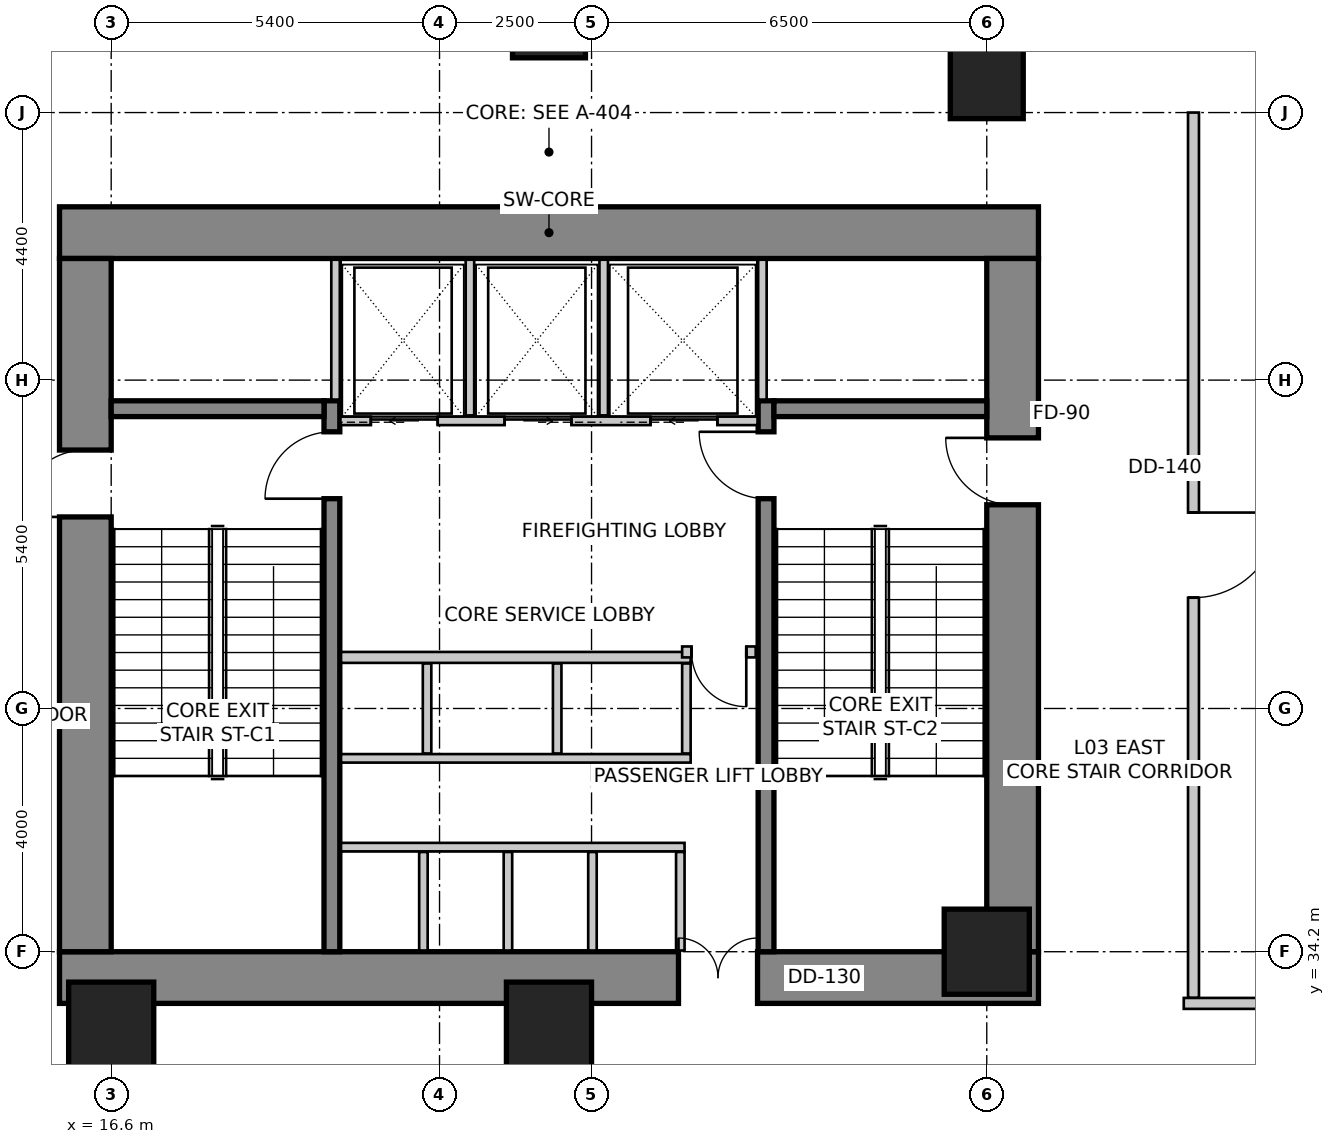
"""IFC4 building model, lengths in metres.
Left out: names, types, materials, properties, quantities, classifications, styles, units other than length and angle.
Written with IfcOpenShell. Run it as: python <this file> out.ifc"""

import sys

from ifc_helpers import new_model, si_unit, direction, frame, frame_2d, origin, origin_2d, place, context, subcontext, project, spatial, rectangle, extrude, source, transform, mapped, element, fill, save


model = new_model("IFC4")
c1 = context("Model", 3, precision=1e-05, world=origin(), true_north=direction((0.0, 1.0)))
c2 = subcontext(c1, "Body", "Model", "MODEL_VIEW")
j1 = project(units=[si_unit("LENGTHUNIT", "METRE"), si_unit("PLANEANGLEUNIT", "RADIAN")], contexts=[c1])
p1 = place(None, origin())
s1 = spatial("IfcSite", under=j1, at=p1, CompositionType="ELEMENT")
p2 = place(p1, origin())
s2 = spatial("IfcBuilding", under=s1, at=p2, CompositionType="ELEMENT")
p3 = place(p2, frame((0.0, 0.0, 11.2)))
s3 = spatial("IfcBuildingStorey", under=s2, at=p3, CompositionType="ELEMENT", Elevation=11.2)
p4 = place(p3, frame((15.75, 46.025, 0.0), z_axis=(0.0, 0.0, 1.0), x_axis=(1.0, 0.0, 0.0)))
e1 = element("IfcWall", 1, at=p4, inside=s3, PredefinedType="SHEAR", context=c2, shape_type="SweptSolid", body=[
    extrude(rectangle(XDim=16.1, YDim=0.85, at=frame_2d((8.05, 0.0))), origin(), (0.0, 0.0, 1.0), 5.2),
])
p5 = place(p3, frame((15.75, 33.775, 0.0), z_axis=(0.0, 0.0, 1.0), x_axis=(1.0, 0.0, 0.0)))
e2 = element("IfcWall", 2, at=p5, inside=s3, PredefinedType="SHEAR", context=c2, shape_type="SweptSolid", body=[
    extrude(rectangle(XDim=16.1, YDim=0.85, at=frame_2d((8.05, 0.0))), origin(), (0.0, 0.0, 1.0), 5.2),
])
m1 = source(origin(), c2, "Body", "SweptSolid", [
    extrude(rectangle(XDim=1.3, YDim=2.15, at=frame_2d((0.65, 1.075))), frame((0.0, 0.435, 0.0), z_axis=(0.0, -1.0, 0.0), x_axis=(1.0, 0.0, 0.0)), (0.0, 0.0, 1.0), 0.87),
])
p6 = place(p5, frame((10.18, 0.0, 0.0)))
e3 = element("IfcOpeningElement", 3, at=p6, cuts=e2, PredefinedType="OPENING", context=c2, shape_type="MappedRepresentation", body=[
    mapped(m1, transform((0.0, 0.0, 0.0), scale=1.0)),
])
p7 = place(p3, frame((16.175, 34.2, 0.0), z_axis=(0.0, 0.0, 1.0), x_axis=(0.0, 1.0, 0.0)))
e4 = element("IfcWall", 4, at=p7, inside=s3, PredefinedType="SHEAR", context=c2, shape_type="SweptSolid", body=[
    extrude(rectangle(XDim=11.4, YDim=0.85, at=frame_2d((5.7, 0.0))), origin(), (0.0, 0.0, 1.0), 5.2),
])
m2 = source(origin(), c2, "Body", "SweptSolid", [
    extrude(rectangle(XDim=1.1, YDim=2.15, at=frame_2d((0.55, 1.075))), frame((0.0, 0.435, 0.0), z_axis=(0.0, -1.0, 0.0), x_axis=(1.0, 0.0, 0.0)), (0.0, 0.0, 1.0), 0.87),
])
p8 = place(p7, frame((7.15, 0.0, 0.0)))
e5 = element("IfcOpeningElement", 5, at=p8, cuts=e4, PredefinedType="OPENING", context=c2, shape_type="MappedRepresentation", body=[
    mapped(m2, transform((0.0, 0.0, 0.0), scale=1.0)),
])
p9 = place(p3, frame((31.425, 34.2, 0.0), z_axis=(0.0, 0.0, 1.0), x_axis=(0.0, 1.0, 0.0)))
e6 = element("IfcWall", 6, at=p9, inside=s3, PredefinedType="SHEAR", context=c2, shape_type="SweptSolid", body=[
    extrude(rectangle(XDim=11.4, YDim=0.85, at=frame_2d((5.7, 0.0))), origin(), (0.0, 0.0, 1.0), 5.2),
])
p10 = place(p9, frame((7.35, 0.0, 0.0)))
e7 = element("IfcOpeningElement", 7, at=p10, cuts=e6, PredefinedType="OPENING", context=c2, shape_type="MappedRepresentation", body=[
    mapped(m2, transform((0.0, 0.0, 0.0), scale=1.0)),
])
p11 = place(p3, frame((20.23, 34.2, 0.0), z_axis=(0.0, 0.0, 1.0), x_axis=(0.0, 1.0, 0.0)))
e8 = element("IfcWall", 8, at=p11, inside=s3, PredefinedType="SHEAR", context=c2, shape_type="SweptSolid", body=[
    extrude(rectangle(XDim=9.06, YDim=0.26, at=frame_2d((4.53, 0.0))), origin(), (0.0, 0.0, 1.0), 5.2),
])
m3 = source(origin(), c2, "Body", "SweptSolid", [
    extrude(rectangle(XDim=1.1, YDim=2.15, at=frame_2d((0.55, 1.075))), frame((0.0, 0.14, 0.0), z_axis=(0.0, -1.0, 0.0), x_axis=(1.0, 0.0, 0.0)), (0.0, 0.0, 1.0), 0.28),
])
p12 = place(p11, frame((7.45, 0.0, 0.0)))
e9 = element("IfcOpeningElement", 9, at=p12, cuts=e8, PredefinedType="OPENING", context=c2, shape_type="MappedRepresentation", body=[
    mapped(m3, transform((0.0, 0.0, 0.0), scale=1.0)),
])
p13 = place(p3, frame((27.37, 34.2, 0.0), z_axis=(0.0, 0.0, 1.0), x_axis=(0.0, 1.0, 0.0)))
e10 = element("IfcWall", 10, at=p13, inside=s3, PredefinedType="SHEAR", context=c2, shape_type="SweptSolid", body=[
    extrude(rectangle(XDim=9.06, YDim=0.26, at=frame_2d((4.53, 0.0))), origin(), (0.0, 0.0, 1.0), 5.2),
])
p14 = place(p13, frame((7.45, 0.0, 0.0)))
e11 = element("IfcOpeningElement", 11, at=p14, cuts=e10, PredefinedType="OPENING", context=c2, shape_type="MappedRepresentation", body=[
    mapped(m3, transform((0.0, 0.0, 0.0), scale=1.0)),
])
for number, where, z_axis, x_axis in (
    (12, (16.6, 43.13, 0.0), (0.0, 0.0, 1.0), (1.0, 0.0, 0.0)),
    (13, (27.5, 43.13, 0.0), (0.0, 0.0, 1.0), (1.0, 0.0, 0.0)),
):
    element("IfcWall", number, at=place(p3, frame(where, z_axis=z_axis, x_axis=x_axis)), inside=s3, PredefinedType="SHEAR", context=c2, shape_type="SweptSolid", body=[
        extrude(rectangle(XDim=3.5, YDim=0.26, at=frame_2d((1.75, 0.0))), origin(), (0.0, 0.0, 1.0), 5.2),
    ])
m4 = source(origin(), c2, "Body", "SweptSolid", [
    extrude(rectangle(XDim=1.4, YDim=1.4, at=origin_2d()), origin(), (0.0, 0.0, 1.0), 5.2),
])
for number, where, z_axis, x_axis in (
    (14, (16.6, 33.0, 0.0), (0.0, 0.0, 1.0), (1.0, 0.0, 0.0)),
    (15, (23.8, 33.0, 0.0), (0.0, 0.0, 1.0), (1.0, 0.0, 0.0)),
    (16, (31.0, 34.2, 0.0), (0.0, 0.0, 1.0), (1.0, 0.0, 0.0)),
):
    element("IfcColumn", number, at=place(p3, frame(where, z_axis=z_axis, x_axis=x_axis)), inside=s3, PredefinedType="COLUMN", context=c2, shape_type="MappedRepresentation", body=[
        mapped(m4, transform((0.0, 0.0, 0.0), scale=1.0)),
    ])
m5 = source(origin(), c2, "Body", "SweptSolid", [
    extrude(rectangle(XDim=1.2, YDim=1.2, at=origin_2d()), origin(), (0.0, 0.0, 1.0), 5.2),
])
for number, where, z_axis, x_axis in (
    (17, (23.8, 49.5, 0.0), (0.0, 0.0, 1.0), (1.0, 0.0, 0.0)),
    (18, (31.0, 48.5, 0.0), (0.0, 0.0, 1.0), (1.0, 0.0, 0.0)),
):
    element("IfcColumn", number, at=place(p3, frame(where, z_axis=z_axis, x_axis=x_axis)), inside=s3, PredefinedType="COLUMN", context=c2, shape_type="MappedRepresentation", body=[
        mapped(m5, transform((0.0, 0.0, 0.0), scale=1.0)),
    ])
p15 = place(p3, frame((20.37, 42.93, 0.0), z_axis=(0.0, 0.0, 1.0), x_axis=(1.0, 0.0, 0.0)))
e19 = element("IfcWall", 19, at=p15, inside=s3, PredefinedType="SOLIDWALL", context=c2, shape_type="SweptSolid", body=[
    extrude(rectangle(XDim=6.86, YDim=0.14, at=frame_2d((3.43, 0.0))), origin(), (0.0, 0.0, 1.0), 4.9),
])
m6 = source(origin(), c2, "Body", "SweptSolid", [
    extrude(rectangle(XDim=1.1, YDim=2.15, at=frame_2d((0.55, 1.075))), frame((0.0, 0.08, 0.0), z_axis=(0.0, -1.0, 0.0), x_axis=(1.0, 0.0, 0.0)), (0.0, 0.0, 1.0), 0.16),
])
p16 = place(p15, frame((0.5, 0.0, 0.0)))
e20 = element("IfcOpeningElement", 20, at=p16, cuts=e19, PredefinedType="OPENING", context=c2, shape_type="MappedRepresentation", body=[
    mapped(m6, transform((0.0, 0.0, 0.0), scale=1.0)),
])
p17 = place(p15, frame((2.7, 0.0, 0.0)))
e21 = element("IfcOpeningElement", 21, at=p17, cuts=e19, PredefinedType="OPENING", context=c2, shape_type="MappedRepresentation", body=[
    mapped(m6, transform((0.0, 0.0, 0.0), scale=1.0)),
])
p18 = place(p15, frame((5.1, 0.0, 0.0)))
e22 = element("IfcOpeningElement", 22, at=p18, cuts=e19, PredefinedType="OPENING", context=c2, shape_type="MappedRepresentation", body=[
    mapped(m6, transform((0.0, 0.0, 0.0), scale=1.0)),
])
for number, where, z_axis, x_axis in (
    (23, (20.29, 43.28, 0.0), (0.0, 0.0, 1.0), (0.0, 1.0, 0.0)),
    (24, (27.31, 43.28, 0.0), (0.0, 0.0, 1.0), (0.0, 1.0, 0.0)),
):
    element("IfcWall", number, at=place(p3, frame(where, z_axis=z_axis, x_axis=x_axis)), inside=s3, PredefinedType="SOLIDWALL", context=c2, shape_type="SweptSolid", body=[
        extrude(rectangle(XDim=2.3, YDim=0.14, at=frame_2d((1.15, 0.0))), origin(), (0.0, 0.0, 1.0), 4.9),
    ])
for number, where, z_axis, x_axis in (
    (25, (22.5, 43.02, 0.0), (0.0, 0.0, 1.0), (0.0, 1.0, 0.0)),
    (26, (24.7, 43.02, 0.0), (0.0, 0.0, 1.0), (0.0, 1.0, 0.0)),
):
    element("IfcWall", number, at=place(p3, frame(where, z_axis=z_axis, x_axis=x_axis)), inside=s3, PredefinedType="SOLIDWALL", context=c2, shape_type="SweptSolid", body=[
        extrude(rectangle(XDim=2.56, YDim=0.14, at=frame_2d((1.28, 0.0))), origin(), (0.0, 0.0, 1.0), 4.9),
    ])
p19 = place(p3, frame((20.38, 35.92, 0.0), z_axis=(0.0, 0.0, 1.0), x_axis=(1.0, 0.0, 0.0)))
e27 = element("IfcWall", 27, at=p19, inside=s3, PredefinedType="SOLIDWALL", context=c2, shape_type="SweptSolid", body=[
    extrude(rectangle(XDim=5.65, YDim=0.14, at=frame_2d((2.825, 0.0))), origin(), (0.0, 0.0, 1.0), 4.9),
])
for number, where, z_axis, x_axis in (
    (28, (25.96, 34.22, 0.0), (0.0, 0.0, 1.0), (0.0, 1.0, 0.0)),
    (29, (21.735, 34.22, 0.0), (0.0, 0.0, 1.0), (0.0, 1.0, 0.0)),
    (30, (23.125, 34.22, 0.0), (0.0, 0.0, 1.0), (0.0, 1.0, 0.0)),
    (31, (24.515, 34.22, 0.0), (0.0, 0.0, 1.0), (0.0, 1.0, 0.0)),
):
    element("IfcWall", number, at=place(p3, frame(where, z_axis=z_axis, x_axis=x_axis)), inside=s3, PredefinedType="SOLIDWALL", context=c2, shape_type="SweptSolid", body=[
        extrude(rectangle(XDim=1.62, YDim=0.14, at=frame_2d((0.81, 0.0))), origin(), (0.0, 0.0, 1.0), 4.9),
    ])
p20 = place(p3, frame((20.38, 37.38, 0.0), z_axis=(0.0, 0.0, 1.0), x_axis=(1.0, 0.0, 0.0)))
e32 = element("IfcWall", 32, at=p20, inside=s3, PredefinedType="SOLIDWALL", context=c2, shape_type="SweptSolid", body=[
    extrude(rectangle(XDim=5.75, YDim=0.14, at=frame_2d((2.875, 0.0))), origin(), (0.0, 0.0, 1.0), 4.9),
])
p21 = place(p3, frame((20.38, 39.04, 0.0), z_axis=(0.0, 0.0, 1.0), x_axis=(1.0, 0.0, 0.0)))
e33 = element("IfcWall", 33, at=p21, inside=s3, PredefinedType="SOLIDWALL", context=c2, shape_type="SweptSolid", body=[
    extrude(rectangle(XDim=5.75, YDim=0.18, at=frame_2d((2.875, 0.0))), origin(), (0.0, 0.0, 1.0), 4.9),
])
for number, where, z_axis, x_axis in (
    (34, (26.06, 37.46, 0.0), (0.0, 0.0, 1.0), (0.0, 1.0, 0.0)),
    (35, (21.795, 37.46, 0.0), (0.0, 0.0, 1.0), (0.0, 1.0, 0.0)),
    (36, (23.935, 37.46, 0.0), (0.0, 0.0, 1.0), (0.0, 1.0, 0.0)),
):
    element("IfcWall", number, at=place(p3, frame(where, z_axis=z_axis, x_axis=x_axis)), inside=s3, PredefinedType="SOLIDWALL", context=c2, shape_type="SweptSolid", body=[
        extrude(rectangle(XDim=1.48, YDim=0.14, at=frame_2d((0.74, 0.0))), origin(), (0.0, 0.0, 1.0), 4.9),
    ])
p22 = place(p3, frame((27.2, 39.13, 0.0), z_axis=(0.0, 0.0, 1.0), x_axis=(-1.0, 0.0, 0.0)))
e37 = element("IfcWall", 37, at=p22, inside=s3, PredefinedType="PARTITIONING", context=c2, shape_type="SweptSolid", body=[
    extrude(rectangle(XDim=1.21, YDim=0.18, at=frame_2d((0.605, 0.0))), origin(), (0.0, 0.0, 1.0), 4.9),
])
m7 = source(origin(), c2, "Body", "SweptSolid", [
    extrude(rectangle(XDim=0.9, YDim=2.15, at=frame_2d((0.45, 1.075))), frame((0.0, 0.1, 0.0), z_axis=(0.0, -1.0, 0.0), x_axis=(1.0, 0.0, 0.0)), (0.0, 0.0, 1.0), 0.2),
])
p23 = place(p22, frame((0.155, 0.0, 0.0)))
e38 = element("IfcOpeningElement", 38, at=p23, cuts=e37, PredefinedType="OPENING", context=c2, shape_type="MappedRepresentation", body=[
    mapped(m7, transform((0.0, 0.0, 0.0), scale=1.0)),
])
p24 = place(p3, frame((34.24, 33.35, 0.0), z_axis=(0.0, 0.0, 1.0), x_axis=(1.0, 0.0, 0.0)))
e39 = element("IfcWall", 39, at=p24, inside=s3, PredefinedType="PARTITIONING", context=c2, shape_type="SweptSolid", body=[
    extrude(rectangle(XDim=33.495, YDim=0.18, at=frame_2d((16.748, 0.0))), origin(), (0.0, 0.0, 1.0), 3.092),
])
p25 = place(p3, frame((34.4, 48.0, 0.0), z_axis=(0.0, 0.0, 1.0), x_axis=(0.0, -1.0, 0.0)))
e40 = element("IfcWall", 40, at=p25, inside=s3, PredefinedType="PARTITIONING", context=c2, shape_type="SweptSolid", body=[
    extrude(rectangle(XDim=14.556, YDim=0.18, at=frame_2d((7.278, 0.0))), origin(), (0.0, 0.0, 1.0), 3.942),
])
m8 = source(origin(), c2, "Body", "SweptSolid", [
    extrude(rectangle(XDim=1.4, YDim=2.15, at=frame_2d((0.7, 1.075))), frame((0.0, 0.1, 0.0), z_axis=(0.0, -1.0, 0.0), x_axis=(1.0, 0.0, 0.0)), (0.0, 0.0, 1.0), 0.2),
])
p26 = place(p25, frame((6.578, 0.0, 0.0)))
e41 = element("IfcOpeningElement", 41, at=p26, cuts=e40, PredefinedType="OPENING", context=c2, shape_type="MappedRepresentation", body=[
    mapped(m8, transform((0.0, 0.0, 0.0), scale=1.0)),
])
m9 = source(origin(), c2, "Body", "SweptSolid", [
    extrude(rectangle(XDim=1.1, YDim=2.15, at=frame_2d((0.55, 1.075))), frame((0.0, 0.025, 0.0), z_axis=(0.0, -1.0, 0.0), x_axis=(1.0, 0.0, 0.0)), (0.0, 0.0, 1.0), 0.05),
])
p27 = place(p16, origin())
e42 = element("IfcDoor", 42, at=p27, inside=s3, OperationType="SLIDING_TO_LEFT", PredefinedType="DOOR", context=c2, shape_type="MappedRepresentation", body=[
    mapped(m9, transform((0.0, 0.0, 0.0), scale=1.0)),
])
fill(e20, e42)
p28 = place(p17, origin())
e43 = element("IfcDoor", 43, at=p28, inside=s3, OperationType="SLIDING_TO_RIGHT", PredefinedType="DOOR", context=c2, shape_type="MappedRepresentation", body=[
    mapped(m9, transform((0.0, 0.0, 0.0), scale=1.0)),
])
fill(e21, e43)
m10 = source(origin(), c2, "Body", "SweptSolid", [
    extrude(rectangle(XDim=1.1, YDim=2.15, at=frame_2d((0.55, 1.075))), frame((0.0, 0.025, 0.0), z_axis=(0.0, -1.0, 0.0), x_axis=(1.0, 0.0, 0.0)), (0.0, 0.0, 1.0), 0.05),
])
p29 = place(p18, origin())
e44 = element("IfcDoor", 44, at=p29, inside=s3, OperationType="SLIDING_TO_LEFT", PredefinedType="DOOR", context=c2, shape_type="MappedRepresentation", body=[
    mapped(m10, transform((0.0, 0.0, 0.0), scale=1.0)),
])
fill(e22, e44)
m11 = source(origin(), c2, "Body", "SweptSolid", [
    extrude(rectangle(XDim=1.1, YDim=2.15, at=frame_2d((0.55, 1.075))), frame((0.0, 0.025, 0.0), z_axis=(0.0, -1.0, 0.0), x_axis=(1.0, 0.0, 0.0)), (0.0, 0.0, 1.0), 0.05),
])
p30 = place(p12, origin())
e45 = element("IfcDoor", 45, at=p30, inside=s3, OperationType="SINGLE_SWING_LEFT", PredefinedType="DOOR", context=c2, shape_type="MappedRepresentation", body=[
    mapped(m11, transform((0.0, 0.0, 0.0), scale=1.0)),
])
fill(e9, e45)
p31 = place(p14, origin())
e46 = element("IfcDoor", 46, at=p31, inside=s3, OperationType="SINGLE_SWING_RIGHT", PredefinedType="DOOR", context=c2, shape_type="MappedRepresentation", body=[
    mapped(m11, transform((0.0, 0.0, 0.0), scale=1.0)),
])
fill(e11, e46)
p32 = place(p8, origin())
e47 = element("IfcDoor", 47, at=p32, inside=s3, OperationType="SINGLE_SWING_LEFT", PredefinedType="DOOR", context=c2, shape_type="MappedRepresentation", body=[
    mapped(m11, transform((0.0, 0.0, 0.0), scale=1.0)),
])
fill(e5, e47)
p33 = place(p10, origin())
e48 = element("IfcDoor", 48, at=p33, inside=s3, OperationType="SINGLE_SWING_RIGHT", PredefinedType="DOOR", context=c2, shape_type="MappedRepresentation", body=[
    mapped(m11, transform((0.0, 0.0, 0.0), scale=1.0)),
])
fill(e7, e48)
m12 = source(origin(), c2, "Body", "SweptSolid", [
    extrude(rectangle(XDim=1.3, YDim=2.15, at=frame_2d((0.65, 1.075))), frame((0.0, 0.025, 0.0), z_axis=(0.0, -1.0, 0.0), x_axis=(1.0, 0.0, 0.0)), (0.0, 0.0, 1.0), 0.05),
])
p34 = place(p6, origin())
e49 = element("IfcDoor", 49, at=p34, inside=s3, OperationType="DOUBLE_DOOR_SINGLE_SWING", PredefinedType="DOOR", context=c2, shape_type="MappedRepresentation", body=[
    mapped(m12, transform((0.0, 0.0, 0.0), scale=1.0)),
])
fill(e3, e49)
m13 = source(origin(), c2, "Body", "SweptSolid", [
    extrude(rectangle(XDim=0.9, YDim=2.15, at=frame_2d((0.45, 1.075))), frame((0.0, 0.025, 0.0), z_axis=(0.0, -1.0, 0.0), x_axis=(1.0, 0.0, 0.0)), (0.0, 0.0, 1.0), 0.05),
])
p35 = place(p23, origin())
e50 = element("IfcDoor", 50, at=p35, inside=s3, OperationType="SINGLE_SWING_LEFT", PredefinedType="DOOR", context=c2, shape_type="MappedRepresentation", body=[
    mapped(m13, transform((0.0, 0.0, 0.0), scale=1.0)),
])
fill(e38, e50)
m14 = source(origin(), c2, "Body", "SweptSolid", [
    extrude(rectangle(XDim=1.4, YDim=2.15, at=frame_2d((0.7, 1.075))), frame((0.0, 0.025, 0.0), z_axis=(0.0, -1.0, 0.0), x_axis=(1.0, 0.0, 0.0)), (0.0, 0.0, 1.0), 0.05),
])
p36 = place(p26, origin())
e51 = element("IfcDoor", 51, at=p36, inside=s3, OperationType="SINGLE_SWING_LEFT", PredefinedType="DOOR", context=c2, shape_type="MappedRepresentation", body=[
    mapped(m14, transform((0.0, 0.0, 0.0), scale=1.0)),
])
fill(e41, e51)
save(model, sys.argv[1])
